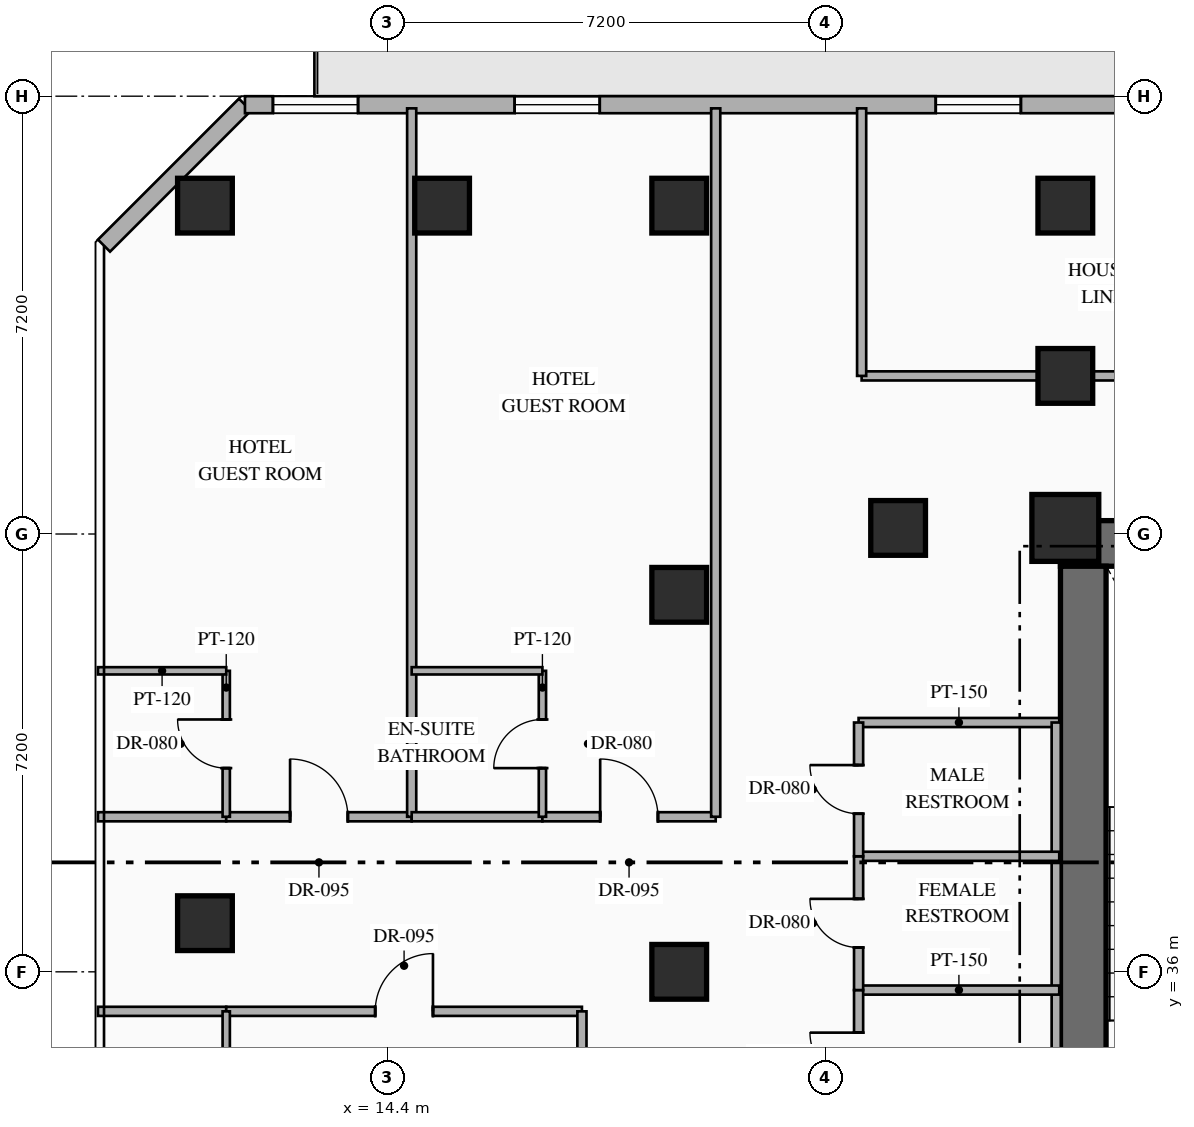
"""IFC4 building model, lengths in metres.
Left out: names, types, materials, properties, quantities, classifications, styles, units other than length and angle.
Written with IfcOpenShell. Run it as: python <this file> out.ifc"""

import sys

from ifc_helpers import new_model, si_unit, direction, frame, frame_2d, origin, origin_2d, place, context, subcontext, project, spatial, rectangle, hollow_rectangle, extrude, element, fill, save


model = new_model("IFC4")
c1 = context("Model", 3, precision=1e-05, world=origin(), true_north=direction((0.0, 1.0)))
c2 = subcontext(c1, "Body", "Model", "MODEL_VIEW")
j1 = project(units=[si_unit("LENGTHUNIT", "METRE"), si_unit("PLANEANGLEUNIT", "RADIAN")], contexts=[c1])
p1 = place(None, origin())
s1 = spatial("IfcSite", under=j1, at=p1, CompositionType="ELEMENT")
p2 = place(p1, origin())
s2 = spatial("IfcBuilding", under=s1, at=p2, CompositionType="ELEMENT")
p3 = place(p2, frame((0.0, 0.0, 88.0)))
s3 = spatial("IfcBuildingStorey", under=s2, at=p3, CompositionType="ELEMENT", Elevation=88.0)
p4 = place(p3, frame((25.47, 43.045, 0.0), z_axis=(0.0, 0.0, 1.0), x_axis=(1.0, 0.0, 0.0)))
e1 = element("IfcWall", 1, at=p4, inside=s3, PredefinedType="SHEAR", context=c2, shape_type="SweptSolid", body=[
    extrude(rectangle(XDim=8.08, YDim=0.75, at=frame_2d((4.04, 0.0))), origin(), (0.0, 0.0, 1.0), 3.35),
])
p5 = place(p3, frame((25.845, 33.19, 0.0), z_axis=(0.0, 0.0, 1.0), x_axis=(0.0, 1.0, 0.0)))
e2 = element("IfcWall", 2, at=p5, inside=s3, PredefinedType="SHEAR", context=c2, shape_type="SweptSolid", body=[
    extrude(rectangle(XDim=9.48, YDim=0.75, at=frame_2d((4.74, 0.0))), origin(), (0.0, 0.0, 1.0), 3.35),
])
p6 = place(p3, frame((25.55, 43.3, 0.0), z_axis=(0.0, 0.0, 1.0), x_axis=(1.0, 0.0, 0.0)))
e3 = element("IfcColumn", 3, at=p6, inside=s3, PredefinedType="COLUMN", context=c2, shape_type="SweptSolid", body=[
    extrude(rectangle(XDim=1.1, YDim=1.1, at=origin_2d()), origin(), (0.0, 0.0, 1.0), 3.35),
])
for number, where, z_axis, x_axis in (
    (4, (25.55, 45.8, 0.0), (0.0, 0.0, 1.0), (1.0, 0.0, 0.0)),
    (5, (11.4, 48.6, 0.0), (0.0, 0.0, 1.0), (1.0, 0.0, 0.0)),
    (6, (19.2, 48.6, 0.0), (0.0, 0.0, 1.0), (1.0, 0.0, 0.0)),
    (7, (25.55, 48.6, 0.0), (0.0, 0.0, 1.0), (1.0, 0.0, 0.0)),
    (8, (19.2, 42.2, 0.0), (0.0, 0.0, 1.0), (1.0, 0.0, 0.0)),
    (9, (22.8, 43.3, 0.0), (0.0, 0.0, 1.0), (1.0, 0.0, 0.0)),
    (10, (11.4, 36.8, 0.0), (0.0, 0.0, 1.0), (1.0, 0.0, 0.0)),
    (11, (19.2, 36.0, 0.0), (0.0, 0.0, 1.0), (1.0, 0.0, 0.0)),
    (12, (15.3, 48.6, 0.0), (0.0, 0.0, 1.0), (1.0, 0.0, 0.0)),
):
    element("IfcColumn", number, at=place(p3, frame(where, z_axis=z_axis, x_axis=x_axis)), inside=s3, PredefinedType="COLUMN", context=c2, shape_type="SweptSolid", body=[
        extrude(hollow_rectangle(XDim=0.9, YDim=0.9, WallThickness=0.036, at=origin_2d()), origin(), (0.0, 0.0, 1.0), 3.35),
    ])
p7 = place(p3, frame((9.74, 47.942, 0.0), z_axis=(0.0, 0.0, 1.0), x_axis=(0.707106781187, 0.707106781187, 0.0)))
e13 = element("IfcWall", 13, at=p7, inside=s3, PredefinedType="STANDARD", context=c2, shape_type="SweptSolid", body=[
    extrude(rectangle(XDim=3.278, YDim=0.28, at=frame_2d((1.639, 0.0))), origin(), (0.0, 0.0, 1.0), 3.05),
])
p8 = place(p3, frame((12.058, 50.26, 0.0), z_axis=(0.0, 0.0, 1.0), x_axis=(1.0, 0.0, 0.0)))
e14 = element("IfcWall", 14, at=p8, inside=s3, PredefinedType="STANDARD", context=c2, shape_type="SweptSolid", body=[
    extrude(rectangle(XDim=30.484, YDim=0.28, at=frame_2d((15.242, 0.0))), origin(), (0.0, 0.0, 1.0), 3.05),
])
p9 = place(p8, frame((14.992, 0.0, 0.0)))
e15 = element("IfcOpeningElement", 15, at=p9, cuts=e14, PredefinedType="OPENING", context=c2, shape_type="SweptSolid", body=[
    extrude(rectangle(XDim=1.1, YDim=2.2, at=frame_2d((0.55, 1.1))), frame((0.0, 0.15, 0.0), z_axis=(0.0, -1.0, 0.0), x_axis=(1.0, 0.0, 0.0)), (0.0, 0.0, 1.0), 0.3),
])
p10 = place(p8, frame((0.46, 0.0, 0.85)))
e16 = element("IfcOpeningElement", 16, at=p10, cuts=e14, PredefinedType="OPENING", context=c2, shape_type="SweptSolid", body=[
    extrude(rectangle(XDim=1.4, YDim=1.8, at=frame_2d((0.7, 0.9))), frame((0.0, 0.15, 0.0), z_axis=(0.0, -1.0, 0.0), x_axis=(1.0, 0.0, 0.0)), (0.0, 0.0, 1.0), 0.3),
])
p11 = place(p8, frame((4.435, 0.0, 0.85)))
e17 = element("IfcOpeningElement", 17, at=p11, cuts=e14, PredefinedType="OPENING", context=c2, shape_type="SweptSolid", body=[
    extrude(rectangle(XDim=1.4, YDim=1.8, at=frame_2d((0.7, 0.9))), frame((0.0, 0.15, 0.0), z_axis=(0.0, -1.0, 0.0), x_axis=(1.0, 0.0, 0.0)), (0.0, 0.0, 1.0), 0.3),
])
p12 = place(p8, frame((11.361, 0.0, 0.85)))
e18 = element("IfcOpeningElement", 18, at=p12, cuts=e14, PredefinedType="OPENING", context=c2, shape_type="SweptSolid", body=[
    extrude(rectangle(XDim=1.4, YDim=1.8, at=frame_2d((0.7, 0.9))), frame((0.0, 0.15, 0.0), z_axis=(0.0, -1.0, 0.0), x_axis=(1.0, 0.0, 0.0)), (0.0, 0.0, 1.0), 0.3),
])
p13 = place(p8, frame((19.693, 0.0, 0.85)))
e19 = element("IfcOpeningElement", 19, at=p13, cuts=e14, PredefinedType="OPENING", context=c2, shape_type="SweptSolid", body=[
    extrude(rectangle(XDim=1.4, YDim=1.8, at=frame_2d((0.7, 0.9))), frame((0.0, 0.15, 0.0), z_axis=(0.0, -1.0, 0.0), x_axis=(1.0, 0.0, 0.0)), (0.0, 0.0, 1.0), 0.3),
])
p14 = place(p8, frame((23.252, 0.0, 0.85)))
e20 = element("IfcOpeningElement", 20, at=p14, cuts=e14, PredefinedType="OPENING", context=c2, shape_type="SweptSolid", body=[
    extrude(rectangle(XDim=1.4, YDim=1.8, at=frame_2d((0.7, 0.9))), frame((0.0, 0.15, 0.0), z_axis=(0.0, -1.0, 0.0), x_axis=(1.0, 0.0, 0.0)), (0.0, 0.0, 1.0), 0.3),
])
p15 = place(p8, frame((27.417, 0.0, 0.85)))
e21 = element("IfcOpeningElement", 21, at=p15, cuts=e14, PredefinedType="OPENING", context=c2, shape_type="SweptSolid", body=[
    extrude(rectangle(XDim=1.4, YDim=1.8, at=frame_2d((0.7, 0.9))), frame((0.0, 0.15, 0.0), z_axis=(0.0, -1.0, 0.0), x_axis=(1.0, 0.0, 0.0)), (0.0, 0.0, 1.0), 0.3),
])
p16 = place(p3, frame((22.15, 40.1, 0.0), z_axis=(0.0, 0.0, 1.0), x_axis=(1.0, 0.0, 0.0)))
e22 = element("IfcWall", 22, at=p16, inside=s3, PredefinedType="PARTITIONING", context=c2, shape_type="SweptSolid", body=[
    extrude(rectangle(XDim=3.3, YDim=0.15, at=frame_2d((1.65, 0.0))), origin(), (0.0, 0.0, 1.0), 3.05),
])
p17 = place(p3, frame((25.4, 33.5, 0.0), z_axis=(0.0, 0.0, 1.0), x_axis=(0.0, 1.0, 0.0)))
e23 = element("IfcWall", 23, at=p17, inside=s3, PredefinedType="PARTITIONING", context=c2, shape_type="SweptSolid", body=[
    extrude(rectangle(XDim=6.6, YDim=0.15, at=frame_2d((3.3, 0.0))), origin(), (0.0, 0.0, 1.0), 3.05),
])
for number, where, z_axis, x_axis in (
    (24, (22.15, 35.7, 0.0), (0.0, 0.0, 1.0), (1.0, 0.0, 0.0)),
    (25, (22.15, 37.9, 0.0), (0.0, 0.0, 1.0), (1.0, 0.0, 0.0)),
):
    element("IfcWall", number, at=place(p3, frame(where, z_axis=z_axis, x_axis=x_axis)), inside=s3, PredefinedType="PARTITIONING", context=c2, shape_type="SweptSolid", body=[
        extrude(rectangle(XDim=3.3, YDim=0.15, at=frame_2d((1.65, 0.0))), origin(), (0.0, 0.0, 1.0), 3.05),
    ])
p18 = place(p3, frame((22.15, 33.5, 0.0), z_axis=(0.0, 0.0, 1.0), x_axis=(0.0, 1.0, 0.0)))
e26 = element("IfcWall", 26, at=p18, inside=s3, PredefinedType="PARTITIONING", context=c2, shape_type="SweptSolid", body=[
    extrude(rectangle(XDim=2.2, YDim=0.15, at=frame_2d((1.1, 0.0))), origin(), (0.0, 0.0, 1.0), 3.05),
])
p19 = place(p18, frame((0.7, 0.0, 0.0)))
e27 = element("IfcOpeningElement", 27, at=p19, cuts=e26, PredefinedType="OPENING", context=c2, shape_type="SweptSolid", body=[
    extrude(rectangle(XDim=0.8, YDim=2.06, at=frame_2d((0.4, 1.03))), frame((0.0, 0.085, 0.0), z_axis=(0.0, -1.0, 0.0), x_axis=(1.0, 0.0, 0.0)), (0.0, 0.0, 1.0), 0.17),
])
p20 = place(p3, frame((22.15, 35.7, 0.0), z_axis=(0.0, 0.0, 1.0), x_axis=(0.0, 1.0, 0.0)))
e28 = element("IfcWall", 28, at=p20, inside=s3, PredefinedType="PARTITIONING", context=c2, shape_type="SweptSolid", body=[
    extrude(rectangle(XDim=2.2, YDim=0.15, at=frame_2d((1.1, 0.0))), origin(), (0.0, 0.0, 1.0), 3.05),
])
p21 = place(p20, frame((0.7, 0.0, 0.0)))
e29 = element("IfcOpeningElement", 29, at=p21, cuts=e28, PredefinedType="OPENING", context=c2, shape_type="SweptSolid", body=[
    extrude(rectangle(XDim=0.8, YDim=2.06, at=frame_2d((0.4, 1.03))), frame((0.0, 0.085, 0.0), z_axis=(0.0, -1.0, 0.0), x_axis=(1.0, 0.0, 0.0)), (0.0, 0.0, 1.0), 0.17),
])
p22 = place(p3, frame((22.15, 37.9, 0.0), z_axis=(0.0, 0.0, 1.0), x_axis=(0.0, 1.0, 0.0)))
e30 = element("IfcWall", 30, at=p22, inside=s3, PredefinedType="PARTITIONING", context=c2, shape_type="SweptSolid", body=[
    extrude(rectangle(XDim=2.2, YDim=0.15, at=frame_2d((1.1, 0.0))), origin(), (0.0, 0.0, 1.0), 3.05),
])
p23 = place(p22, frame((0.7, 0.0, 0.0)))
e31 = element("IfcOpeningElement", 31, at=p23, cuts=e30, PredefinedType="OPENING", context=c2, shape_type="SweptSolid", body=[
    extrude(rectangle(XDim=0.8, YDim=2.06, at=frame_2d((0.4, 1.03))), frame((0.0, 0.085, 0.0), z_axis=(0.0, -1.0, 0.0), x_axis=(1.0, 0.0, 0.0)), (0.0, 0.0, 1.0), 0.17),
])
p24 = place(p3, frame((22.2, 45.8, 0.0), z_axis=(0.0, 0.0, 1.0), x_axis=(1.0, 0.0, 0.0)))
e32 = element("IfcWall", 32, at=p24, inside=s3, PredefinedType="PARTITIONING", context=c2, shape_type="SweptSolid", body=[
    extrude(rectangle(XDim=9.2, YDim=0.15, at=frame_2d((4.6, 0.0))), origin(), (0.0, 0.0, 1.0), 2.345),
])
p25 = place(p24, frame((5.248, 0.0, 0.0)))
e33 = element("IfcOpeningElement", 33, at=p25, cuts=e32, PredefinedType="OPENING", context=c2, shape_type="SweptSolid", body=[
    extrude(rectangle(XDim=0.95, YDim=2.15, at=frame_2d((0.475, 1.075))), frame((0.0, 0.085, 0.0), z_axis=(0.0, -1.0, 0.0), x_axis=(1.0, 0.0, 0.0)), (0.0, 0.0, 1.0), 0.17),
])
p26 = place(p3, frame((22.2, 45.8, 0.0), z_axis=(0.0, 0.0, 1.0), x_axis=(0.0, 1.0, 0.0)))
e34 = element("IfcWall", 34, at=p26, inside=s3, PredefinedType="PARTITIONING", context=c2, shape_type="SweptSolid", body=[
    extrude(rectangle(XDim=4.4, YDim=0.15, at=frame_2d((2.2, 0.0))), origin(), (0.0, 0.0, 1.0), 3.05),
])
p27 = place(p3, frame((9.64, 38.55, 0.0), z_axis=(0.0, 0.0, 1.0), x_axis=(1.0, 0.0, 0.0)))
e35 = element("IfcWall", 35, at=p27, inside=s3, PredefinedType="PARTITIONING", context=c2, shape_type="SweptSolid", body=[
    extrude(rectangle(XDim=2.11, YDim=0.15, at=frame_2d((1.055, 0.0))), origin(), (0.0, 0.0, 1.0), 2.695),
])
p28 = place(p3, frame((11.75, 38.55, 0.0), z_axis=(0.0, 0.0, 1.0), x_axis=(1.0, 0.0, 0.0)))
e36 = element("IfcWall", 36, at=p28, inside=s3, PredefinedType="PARTITIONING", context=c2, shape_type="SweptSolid", body=[
    extrude(rectangle(XDim=3.05, YDim=0.15, at=frame_2d((1.525, 0.0))), origin(), (0.0, 0.0, 1.0), 2.695),
])
p29 = place(p28, frame((1.05, 0.0, 0.0)))
e37 = element("IfcOpeningElement", 37, at=p29, cuts=e36, PredefinedType="OPENING", context=c2, shape_type="SweptSolid", body=[
    extrude(rectangle(XDim=0.95, YDim=2.15, at=frame_2d((0.475, 1.075))), frame((0.0, 0.085, 0.0), z_axis=(0.0, -1.0, 0.0), x_axis=(1.0, 0.0, 0.0)), (0.0, 0.0, 1.0), 0.17),
])
p30 = place(p3, frame((11.75, 38.55, 0.0), z_axis=(0.0, 0.0, 1.0), x_axis=(0.0, 1.0, 0.0)))
e38 = element("IfcWall", 38, at=p30, inside=s3, PredefinedType="PARTITIONING", context=c2, shape_type="SweptSolid", body=[
    extrude(rectangle(XDim=2.4, YDim=0.12, at=frame_2d((1.2, 0.0))), origin(), (0.0, 0.0, 1.0), 3.05),
])
p31 = place(p30, frame((0.8, 0.0, 0.0)))
e39 = element("IfcOpeningElement", 39, at=p31, cuts=e38, PredefinedType="OPENING", context=c2, shape_type="SweptSolid", body=[
    extrude(rectangle(XDim=0.8, YDim=2.06, at=frame_2d((0.4, 1.03))), frame((0.0, 0.07, 0.0), z_axis=(0.0, -1.0, 0.0), x_axis=(1.0, 0.0, 0.0)), (0.0, 0.0, 1.0), 0.14),
])
p32 = place(p3, frame((9.64, 40.95, 0.0), z_axis=(0.0, 0.0, 1.0), x_axis=(1.0, 0.0, 0.0)))
e40 = element("IfcWall", 40, at=p32, inside=s3, PredefinedType="PARTITIONING", context=c2, shape_type="SweptSolid", body=[
    extrude(rectangle(XDim=2.11, YDim=0.12, at=frame_2d((1.055, 0.0))), origin(), (0.0, 0.0, 1.0), 2.695),
])
p33 = place(p3, frame((14.8, 38.55, 0.0), z_axis=(0.0, 0.0, 1.0), x_axis=(0.0, 1.0, 0.0)))
e41 = element("IfcWall", 41, at=p33, inside=s3, PredefinedType="PARTITIONING", context=c2, shape_type="SweptSolid", body=[
    extrude(rectangle(XDim=11.65, YDim=0.15, at=frame_2d((5.825, 0.0))), origin(), (0.0, 0.0, 1.0), 3.05),
])
p34 = place(p3, frame((14.8, 38.55, 0.0), z_axis=(0.0, 0.0, 1.0), x_axis=(1.0, 0.0, 0.0)))
e42 = element("IfcWall", 42, at=p34, inside=s3, PredefinedType="PARTITIONING", context=c2, shape_type="SweptSolid", body=[
    extrude(rectangle(XDim=2.15, YDim=0.15, at=frame_2d((1.075, 0.0))), origin(), (0.0, 0.0, 1.0), 2.695),
])
p35 = place(p3, frame((16.95, 38.55, 0.0), z_axis=(0.0, 0.0, 1.0), x_axis=(1.0, 0.0, 0.0)))
e43 = element("IfcWall", 43, at=p35, inside=s3, PredefinedType="PARTITIONING", context=c2, shape_type="SweptSolid", body=[
    extrude(rectangle(XDim=2.85, YDim=0.15, at=frame_2d((1.425, 0.0))), origin(), (0.0, 0.0, 1.0), 2.695),
])
p36 = place(p35, frame((0.95, 0.0, 0.0)))
e44 = element("IfcOpeningElement", 44, at=p36, cuts=e43, PredefinedType="OPENING", context=c2, shape_type="SweptSolid", body=[
    extrude(rectangle(XDim=0.95, YDim=2.15, at=frame_2d((0.475, 1.075))), frame((0.0, 0.085, 0.0), z_axis=(0.0, -1.0, 0.0), x_axis=(1.0, 0.0, 0.0)), (0.0, 0.0, 1.0), 0.17),
])
p37 = place(p3, frame((16.95, 38.55, 0.0), z_axis=(0.0, 0.0, 1.0), x_axis=(0.0, 1.0, 0.0)))
e45 = element("IfcWall", 45, at=p37, inside=s3, PredefinedType="PARTITIONING", context=c2, shape_type="SweptSolid", body=[
    extrude(rectangle(XDim=2.4, YDim=0.12, at=frame_2d((1.2, 0.0))), origin(), (0.0, 0.0, 1.0), 3.05),
])
p38 = place(p37, frame((0.8, 0.0, 0.0)))
e46 = element("IfcOpeningElement", 46, at=p38, cuts=e45, PredefinedType="OPENING", context=c2, shape_type="SweptSolid", body=[
    extrude(rectangle(XDim=0.8, YDim=2.06, at=frame_2d((0.4, 1.03))), frame((0.0, 0.07, 0.0), z_axis=(0.0, -1.0, 0.0), x_axis=(1.0, 0.0, 0.0)), (0.0, 0.0, 1.0), 0.14),
])
p39 = place(p3, frame((14.8, 40.95, 0.0), z_axis=(0.0, 0.0, 1.0), x_axis=(1.0, 0.0, 0.0)))
e47 = element("IfcWall", 47, at=p39, inside=s3, PredefinedType="PARTITIONING", context=c2, shape_type="SweptSolid", body=[
    extrude(rectangle(XDim=2.15, YDim=0.12, at=frame_2d((1.075, 0.0))), origin(), (0.0, 0.0, 1.0), 2.695),
])
p40 = place(p3, frame((19.8, 38.55, 0.0), z_axis=(0.0, 0.0, 1.0), x_axis=(0.0, 1.0, 0.0)))
e48 = element("IfcWall", 48, at=p40, inside=s3, PredefinedType="PARTITIONING", context=c2, shape_type="SweptSolid", body=[
    extrude(rectangle(XDim=11.65, YDim=0.15, at=frame_2d((5.825, 0.0))), origin(), (0.0, 0.0, 1.0), 3.05),
])
p41 = place(p3, frame((9.64, 35.35, 0.0), z_axis=(0.0, 0.0, 1.0), x_axis=(1.0, 0.0, 0.0)))
e49 = element("IfcWall", 49, at=p41, inside=s3, PredefinedType="PARTITIONING", context=c2, shape_type="SweptSolid", body=[
    extrude(rectangle(XDim=2.11, YDim=0.15, at=frame_2d((1.055, 0.0))), origin(), (0.0, 0.0, 1.0), 3.05),
])
p42 = place(p3, frame((11.75, 35.35, 0.0), z_axis=(0.0, 0.0, 1.0), x_axis=(1.0, 0.0, 0.0)))
e50 = element("IfcWall", 50, at=p42, inside=s3, PredefinedType="PARTITIONING", context=c2, shape_type="SweptSolid", body=[
    extrude(rectangle(XDim=5.85, YDim=0.15, at=frame_2d((2.925, 0.0))), origin(), (0.0, 0.0, 1.0), 3.05),
])
p43 = place(p42, frame((2.45, 0.0, 0.0)))
e51 = element("IfcOpeningElement", 51, at=p43, cuts=e50, PredefinedType="OPENING", context=c2, shape_type="SweptSolid", body=[
    extrude(rectangle(XDim=0.95, YDim=2.15, at=frame_2d((0.475, 1.075))), frame((0.0, 0.085, 0.0), z_axis=(0.0, -1.0, 0.0), x_axis=(1.0, 0.0, 0.0)), (0.0, 0.0, 1.0), 0.17),
])
p44 = place(p3, frame((11.75, 32.95, 0.0), z_axis=(0.0, 0.0, 1.0), x_axis=(0.0, 1.0, 0.0)))
e52 = element("IfcWall", 52, at=p44, inside=s3, PredefinedType="PARTITIONING", context=c2, shape_type="SweptSolid", body=[
    extrude(rectangle(XDim=2.4, YDim=0.12, at=frame_2d((1.2, 0.0))), origin(), (0.0, 0.0, 1.0), 3.05),
])
p45 = place(p44, frame((0.8, 0.0, 0.0)))
e53 = element("IfcOpeningElement", 53, at=p45, cuts=e52, PredefinedType="OPENING", context=c2, shape_type="SweptSolid", body=[
    extrude(rectangle(XDim=0.8, YDim=2.06, at=frame_2d((0.4, 1.03))), frame((0.0, 0.07, 0.0), z_axis=(0.0, -1.0, 0.0), x_axis=(1.0, 0.0, 0.0)), (0.0, 0.0, 1.0), 0.14),
])
p46 = place(p3, frame((17.6, 23.6, 0.0), z_axis=(0.0, 0.0, 1.0), x_axis=(0.0, 1.0, 0.0)))
e54 = element("IfcWall", 54, at=p46, inside=s3, PredefinedType="PARTITIONING", context=c2, shape_type="SweptSolid", body=[
    extrude(rectangle(XDim=11.75, YDim=0.15, at=frame_2d((5.875, 0.0))), origin(), (0.0, 0.0, 1.0), 3.05),
])
p47 = place(p10, origin())
e55 = element("IfcWindow", 55, at=p47, inside=s3, PartitioningType="SINGLE_PANEL", PredefinedType="WINDOW", context=c2, shape_type="SweptSolid", body=[
    extrude(rectangle(XDim=1.4, YDim=1.8, at=frame_2d((0.7, 0.9))), frame((0.0, 0.03, 0.0), z_axis=(0.0, -1.0, 0.0), x_axis=(1.0, 0.0, 0.0)), (0.0, 0.0, 1.0), 0.06),
])
fill(e16, e55)
p48 = place(p11, origin())
e56 = element("IfcWindow", 56, at=p48, inside=s3, PartitioningType="SINGLE_PANEL", PredefinedType="WINDOW", context=c2, shape_type="SweptSolid", body=[
    extrude(rectangle(XDim=1.4, YDim=1.8, at=frame_2d((0.7, 0.9))), frame((0.0, 0.03, 0.0), z_axis=(0.0, -1.0, 0.0), x_axis=(1.0, 0.0, 0.0)), (0.0, 0.0, 1.0), 0.06),
])
fill(e17, e56)
p49 = place(p12, origin())
e57 = element("IfcWindow", 57, at=p49, inside=s3, PartitioningType="SINGLE_PANEL", PredefinedType="WINDOW", context=c2, shape_type="SweptSolid", body=[
    extrude(rectangle(XDim=1.4, YDim=1.8, at=frame_2d((0.7, 0.9))), frame((0.0, 0.03, 0.0), z_axis=(0.0, -1.0, 0.0), x_axis=(1.0, 0.0, 0.0)), (0.0, 0.0, 1.0), 0.06),
])
fill(e18, e57)
p50 = place(p19, origin())
e58 = element("IfcDoor", 58, at=p50, inside=s3, OperationType="SINGLE_SWING_RIGHT", PredefinedType="DOOR", context=c2, shape_type="SweptSolid", body=[
    extrude(rectangle(XDim=0.8, YDim=2.06, at=frame_2d((0.4, 1.03))), frame((0.0, 0.025, 0.0), z_axis=(0.0, -1.0, 0.0), x_axis=(1.0, 0.0, 0.0)), (0.0, 0.0, 1.0), 0.05),
])
fill(e27, e58)
p51 = place(p21, origin())
e59 = element("IfcDoor", 59, at=p51, inside=s3, OperationType="SINGLE_SWING_RIGHT", PredefinedType="DOOR", context=c2, shape_type="SweptSolid", body=[
    extrude(rectangle(XDim=0.8, YDim=2.06, at=frame_2d((0.4, 1.03))), frame((0.0, 0.025, 0.0), z_axis=(0.0, -1.0, 0.0), x_axis=(1.0, 0.0, 0.0)), (0.0, 0.0, 1.0), 0.05),
])
fill(e29, e59)
p52 = place(p23, origin())
e60 = element("IfcDoor", 60, at=p52, inside=s3, OperationType="SINGLE_SWING_RIGHT", PredefinedType="DOOR", context=c2, shape_type="SweptSolid", body=[
    extrude(rectangle(XDim=0.8, YDim=2.06, at=frame_2d((0.4, 1.03))), frame((0.0, 0.025, 0.0), z_axis=(0.0, -1.0, 0.0), x_axis=(1.0, 0.0, 0.0)), (0.0, 0.0, 1.0), 0.05),
])
fill(e31, e60)
p53 = place(p29, origin())
e61 = element("IfcDoor", 61, at=p53, inside=s3, OperationType="SINGLE_SWING_LEFT", PredefinedType="DOOR", context=c2, shape_type="SweptSolid", body=[
    extrude(rectangle(XDim=0.95, YDim=2.15, at=frame_2d((0.475, 1.075))), frame((0.0, 0.025, 0.0), z_axis=(0.0, -1.0, 0.0), x_axis=(1.0, 0.0, 0.0)), (0.0, 0.0, 1.0), 0.05),
])
fill(e37, e61)
p54 = place(p31, origin())
e62 = element("IfcDoor", 62, at=p54, inside=s3, OperationType="SINGLE_SWING_RIGHT", PredefinedType="DOOR", context=c2, shape_type="SweptSolid", body=[
    extrude(rectangle(XDim=0.8, YDim=2.06, at=frame_2d((0.4, 1.03))), frame((0.0, 0.025, 0.0), z_axis=(0.0, -1.0, 0.0), x_axis=(1.0, 0.0, 0.0)), (0.0, 0.0, 1.0), 0.05),
])
fill(e39, e62)
p55 = place(p36, origin())
e63 = element("IfcDoor", 63, at=p55, inside=s3, OperationType="SINGLE_SWING_LEFT", PredefinedType="DOOR", context=c2, shape_type="SweptSolid", body=[
    extrude(rectangle(XDim=0.95, YDim=2.15, at=frame_2d((0.475, 1.075))), frame((0.0, 0.025, 0.0), z_axis=(0.0, -1.0, 0.0), x_axis=(1.0, 0.0, 0.0)), (0.0, 0.0, 1.0), 0.05),
])
fill(e44, e63)
p56 = place(p38, origin())
e64 = element("IfcDoor", 64, at=p56, inside=s3, OperationType="SINGLE_SWING_LEFT", PredefinedType="DOOR", context=c2, shape_type="SweptSolid", body=[
    extrude(rectangle(XDim=0.8, YDim=2.06, at=frame_2d((0.4, 1.03))), frame((0.0, 0.025, 0.0), z_axis=(0.0, -1.0, 0.0), x_axis=(1.0, 0.0, 0.0)), (0.0, 0.0, 1.0), 0.05),
])
fill(e46, e64)
p57 = place(p43, origin())
e65 = element("IfcDoor", 65, at=p57, inside=s3, OperationType="SINGLE_SWING_RIGHT", PredefinedType="DOOR", context=c2, shape_type="SweptSolid", body=[
    extrude(rectangle(XDim=0.95, YDim=2.15, at=frame_2d((0.475, 1.075))), frame((0.0, 0.025, 0.0), z_axis=(0.0, -1.0, 0.0), x_axis=(1.0, 0.0, 0.0)), (0.0, 0.0, 1.0), 0.05),
])
fill(e51, e65)
save(model, sys.argv[1])
